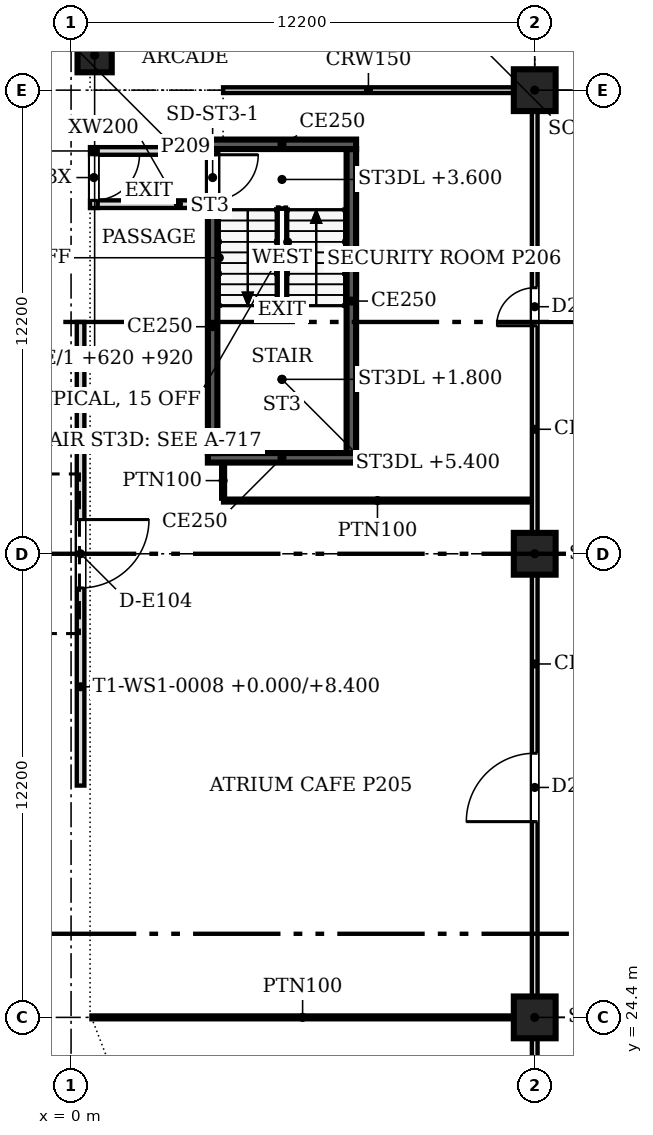
"""IFC4 building model, lengths in metres.
Left out: names, types, materials, properties, quantities, classifications, styles, units other than length and angle.
Written with IfcOpenShell. Run it as: python <this file> out.ifc"""

import sys

from ifc_helpers import new_model, si_unit, direction, frame, frame_2d, origin, origin_2d, place, context, subcontext, project, spatial, polyline, rectangle, outline, extrude, faceted_brep, source, transform, mapped, element, fill, save


model = new_model("IFC4")
c1 = context("Model", 3, precision=1e-05, world=origin(), true_north=direction((0.0, 1.0)))
c2 = subcontext(c1, "Body", "Model", "MODEL_VIEW")
j1 = project(units=[si_unit("LENGTHUNIT", "METRE"), si_unit("PLANEANGLEUNIT", "RADIAN")], contexts=[c1])
p1 = place(None, origin())
s1 = spatial("IfcSite", under=j1, at=p1, CompositionType="ELEMENT")
p2 = place(p1, origin())
s2 = spatial("IfcBuilding", under=s1, at=p2, CompositionType="ELEMENT")
p3 = place(p2, origin())
s3 = spatial("IfcBuildingStorey", under=s2, at=p3, CompositionType="ELEMENT", Elevation=0.0)
for number, where, z_axis, x_axis in (
    (1, (12.2, 24.4, 0.0), (0.0, 0.0, 1.0), (1.0, 0.0, 0.0)),
    (2, (12.2, 36.6, 0.0), (0.0, 0.0, 1.0), (1.0, 0.0, 0.0)),
    (3, (12.2, 48.8, 0.0), (0.0, 0.0, 1.0), (1.0, 0.0, 0.0)),
):
    element("IfcColumn", number, at=place(p3, frame(where, z_axis=z_axis, x_axis=x_axis)), inside=s3, PredefinedType="COLUMN", context=c2, shape_type="SweptSolid", body=[
        extrude(rectangle(XDim=1.1, YDim=1.1, at=origin_2d()), origin(), (0.0, 0.0, 1.0), 6.95),
    ])
p4 = place(p3, frame((0.62, 49.72, 0.0), z_axis=(0.0, 0.0, 1.0), x_axis=(1.0, 0.0, 0.0)))
e4 = element("IfcColumn", 4, at=p4, inside=s3, PredefinedType="COLUMN", context=c2, shape_type="SweptSolid", body=[
    extrude(rectangle(XDim=0.9, YDim=0.9, at=origin_2d()), origin(), (0.0, 0.0, 1.0), 6.95),
])
m1 = source(origin(), c2, "Body", "Brep", [
    faceted_brep([(0.0, -0.1, 0.0), (1.472, -0.1, 0.0), (1.472, -0.1, 6.383), (0.019, -0.1, 8.4), (0.0, -0.1, 8.373), (0.037, 0.1, 8.374), (1.472, 0.1, 6.383), (1.472, 0.1, 0.0), (0.037, 0.1, 0.0), (0.019, 0.0, 8.4)], [[[0, 1, 2, 3, 4]], [[5, 6, 7, 8]], [[8, 7, 1, 0]], [[7, 6, 2, 1]], [[6, 5, 9, 3, 2]], [[4, 3, 9]], [[8, 0, 4, 9, 5]]]),
])
p5 = place(p3, frame((0.25, 48.772, 0.0), z_axis=(0.0, 0.0, 1.0), x_axis=(0.0, -1.0, 0.0)))
e5 = element("IfcWall", 5, at=p5, inside=s3, PredefinedType="PARTITIONING", context=c2, shape_type="MappedRepresentation", body=[
    mapped(m1, transform((0.0, 0.0, 0.0), scale=1.0)),
])
m2 = source(origin(), c2, "Body", "SweptSolid", [
    extrude(outline(polyline([(0.219, 0.12), (1.352, 0.12), (1.352, 6.344), (0.219, 7.917), (0.219, 0.12)])), frame((0.0, 0.11, 0.0), z_axis=(0.0, -1.0, 0.0), x_axis=(1.0, 0.0, 0.0)), (0.0, 0.0, 1.0), 0.22),
])
p6 = place(p5, origin())
e6 = element("IfcOpeningElement", 6, at=p6, cuts=e5, PredefinedType="OPENING", context=c2, shape_type="MappedRepresentation", body=[
    mapped(m2, transform((0.0, 0.0, 0.0), scale=1.0)),
])
m3 = source(origin(), c2, "Body", "SweptSolid", [
    extrude(outline(polyline([(0.0, 0.0), (3.0, 0.0), (0.0, 4.163), (0.0, 0.0)])), frame((0.0, 0.1, 0.0), z_axis=(0.0, -1.0, 0.0), x_axis=(1.0, 0.0, 0.0)), (0.0, 0.0, 1.0), 0.2),
])
p7 = place(p3, frame((0.25, 45.7, 0.0), z_axis=(0.0, 0.0, 1.0), x_axis=(0.0, -1.0, 0.0)))
e7 = element("IfcWall", 7, at=p7, inside=s3, PredefinedType="PARTITIONING", context=c2, shape_type="MappedRepresentation", body=[
    mapped(m3, transform((0.0, 0.0, 0.0), scale=1.0)),
])
m4 = source(origin(), c2, "Body", "SweptSolid", [
    extrude(outline(polyline([(0.12, 0.12), (2.766, 0.12), (0.12, 3.791), (0.12, 0.12)])), frame((0.0, 0.11, 0.0), z_axis=(0.0, -1.0, 0.0), x_axis=(1.0, 0.0, 0.0)), (0.0, 0.0, 1.0), 0.22),
])
p8 = place(p7, origin())
e8 = element("IfcOpeningElement", 8, at=p8, cuts=e7, PredefinedType="OPENING", context=c2, shape_type="MappedRepresentation", body=[
    mapped(m4, transform((0.0, 0.0, 0.0), scale=1.0)),
])
m5 = source(origin(), c2, "Body", "SweptSolid", [
    extrude(outline(polyline([(1.6, 0.0), (1.6, 1.563), (0.0, 3.783), (0.0, 0.0), (1.6, 0.0)])), frame((0.0, 0.1, 0.0), z_axis=(0.0, -1.0, 0.0), x_axis=(1.0, 0.0, 0.0)), (0.0, 0.0, 1.0), 0.2),
])
p9 = place(p3, frame((0.25, 47.3, 2.6), z_axis=(0.0, 0.0, 1.0), x_axis=(0.0, -1.0, 0.0)))
e9 = element("IfcWall", 9, at=p9, inside=s3, PredefinedType="PARTITIONING", context=c2, shape_type="MappedRepresentation", body=[
    mapped(m5, transform((0.0, 0.0, 0.0), scale=1.0)),
])
m6 = source(origin(), c2, "Body", "SweptSolid", [
    extrude(outline(polyline([(1.48, 0.12), (1.48, 1.524), (0.12, 3.411), (0.12, 0.12), (1.48, 0.12)])), frame((0.0, 0.11, 0.0), z_axis=(0.0, -1.0, 0.0), x_axis=(1.0, 0.0, 0.0)), (0.0, 0.0, 1.0), 0.22),
])
p10 = place(p9, origin())
e10 = element("IfcOpeningElement", 10, at=p10, cuts=e9, PredefinedType="OPENING", context=c2, shape_type="MappedRepresentation", body=[
    mapped(m6, transform((0.0, 0.0, 0.0), scale=1.0)),
])
m7 = source(origin(), c2, "Body", "SweptSolid", [
    extrude(outline(polyline([(0.0, 0.0), (12.2, 0.0), (6.1, 8.4), (0.0, 0.0)])), frame((0.0, 0.1, 0.0), z_axis=(0.0, -1.0, 0.0), x_axis=(1.0, 0.0, 0.0)), (0.0, 0.0, 1.0), 0.2),
])
p11 = place(p3, frame((0.25, 42.7, 0.0), z_axis=(0.0, 0.0, 1.0), x_axis=(0.0, -1.0, 0.0)))
e11 = element("IfcWall", 11, at=p11, inside=s3, PredefinedType="PARTITIONING", context=c2, shape_type="MappedRepresentation", body=[
    mapped(m7, transform((0.0, 0.0, 0.0), scale=1.0)),
])
m8 = source(origin(), c2, "Body", "SweptSolid", [
    extrude(rectangle(XDim=1.8, YDim=3.0, at=frame_2d((0.9, 1.5))), frame((0.0, 0.11, 0.0), z_axis=(0.0, -1.0, 0.0), x_axis=(1.0, 0.0, 0.0)), (0.0, 0.0, 1.0), 0.22),
])
p12 = place(p11, frame((5.2, 0.0, 0.0)))
e12 = element("IfcOpeningElement", 12, at=p12, cuts=e11, PredefinedType="OPENING", context=c2, shape_type="MappedRepresentation", body=[
    mapped(m8, transform((0.0, 0.0, 0.0), scale=1.0)),
])
m9 = source(origin(), c2, "Body", "SweptSolid", [
    extrude(outline(polyline([(9.749, 3.12), (6.1, 8.145), (2.451, 3.12), (9.749, 3.12)])), frame((0.0, 0.11, 0.0), z_axis=(0.0, -1.0, 0.0), x_axis=(1.0, 0.0, 0.0)), (0.0, 0.0, 1.0), 0.22),
])
p13 = place(p11, origin())
e13 = element("IfcOpeningElement", 13, at=p13, cuts=e11, PredefinedType="OPENING", context=c2, shape_type="MappedRepresentation", body=[
    mapped(m9, transform((0.0, 0.0, 0.0), scale=1.0)),
])
m10 = source(origin(), c2, "Body", "SweptSolid", [
    extrude(outline(polyline([(0.294, 0.15), (5.08, 0.15), (5.08, 3.0), (2.364, 3.0), (0.294, 0.15)])), frame((0.0, 0.11, 0.0), z_axis=(0.0, -1.0, 0.0), x_axis=(1.0, 0.0, 0.0)), (0.0, 0.0, 1.0), 0.22),
])
p14 = place(p11, origin())
e14 = element("IfcOpeningElement", 14, at=p14, cuts=e11, PredefinedType="OPENING", context=c2, shape_type="MappedRepresentation", body=[
    mapped(m10, transform((0.0, 0.0, 0.0), scale=1.0)),
])
m11 = source(origin(), c2, "Body", "SweptSolid", [
    extrude(outline(polyline([(7.12, 0.15), (11.906, 0.15), (9.836, 3.0), (7.12, 3.0), (7.12, 0.15)])), frame((0.0, 0.11, 0.0), z_axis=(0.0, -1.0, 0.0), x_axis=(1.0, 0.0, 0.0)), (0.0, 0.0, 1.0), 0.22),
])
p15 = place(p11, origin())
e15 = element("IfcOpeningElement", 15, at=p15, cuts=e11, PredefinedType="OPENING", context=c2, shape_type="MappedRepresentation", body=[
    mapped(m11, transform((0.0, 0.0, 0.0), scale=1.0)),
])
m12 = source(origin(), c2, "Body", "Brep", [
    faceted_brep([(0.0, -0.1, 0.0), (6.072, -0.1, 0.0), (6.072, -0.1, 8.373), (6.053, -0.1, 8.4), (6.035, 0.1, 0.0), (0.0, 0.1, 0.0), (6.035, 0.1, 8.374), (6.053, 0.0, 8.4)], [[[0, 1, 2, 3]], [[4, 5, 6]], [[5, 4, 1, 0]], [[7, 3, 2]], [[6, 5, 0, 3, 7]], [[1, 4, 6, 7, 2]]]),
])
p16 = place(p3, frame((0.25, 30.5, 0.0), z_axis=(0.0, 0.0, 1.0), x_axis=(0.0, -1.0, 0.0)))
e16 = element("IfcWall", 16, at=p16, inside=s3, PredefinedType="PARTITIONING", context=c2, shape_type="MappedRepresentation", body=[
    mapped(m12, transform((0.0, 0.0, 0.0), scale=1.0)),
])
m13 = source(origin(), c2, "Body", "SweptSolid", [
    extrude(outline(polyline([(0.293, 0.15), (5.854, 0.15), (5.854, 7.866), (0.293, 0.15)])), frame((0.0, 0.11, 0.0), z_axis=(0.0, -1.0, 0.0), x_axis=(1.0, 0.0, 0.0)), (0.0, 0.0, 1.0), 0.22),
])
p17 = place(p16, origin())
e17 = element("IfcOpeningElement", 17, at=p17, cuts=e16, PredefinedType="OPENING", context=c2, shape_type="MappedRepresentation", body=[
    mapped(m13, transform((0.0, 0.0, 0.0), scale=1.0)),
])
m14 = source(origin(), c2, "Body", "Brep", [
    faceted_brep([(0.0, -0.25, 0.0), (6.1, -0.25, 8.4), (6.1, -0.25, 8.4), (5.482, -0.25, 8.4), (0.0, -0.25, 0.851), (0.0, 0.25, 0.851), (5.482, 0.25, 8.4), (6.1, 0.25, 8.4), (6.1, 0.25, 8.4), (0.0, 0.25, 0.0)], [[[0, 1, 2, 3, 4]], [[5, 6, 7, 8, 9]], [[9, 8, 1, 0]], [[7, 6, 3, 2]], [[6, 5, 4, 3]], [[5, 9, 0, 4]], [[1, 8, 7, 2]]]),
])
p18 = place(p3, frame((0.25, 42.7, 0.0), z_axis=(0.0, 0.0, 1.0), x_axis=(0.0, -1.0, 0.0)))
e18 = element("IfcWall", 18, at=p18, inside=s3, PredefinedType="SOLIDWALL", context=c2, shape_type="MappedRepresentation", body=[
    mapped(m14, transform((0.0, 0.0, 0.0), scale=1.0)),
])
m15 = source(origin(), c2, "Body", "Brep", [
    faceted_brep([(0.0, -0.25, 8.4), (6.053, -0.25, 0.0), (6.053, -0.25, 0.851), (0.613, -0.25, 8.4), (0.613, 0.25, 8.4), (6.053, 0.25, 0.851), (6.053, 0.25, 0.0), (0.047, 0.25, 8.335), (0.047, 0.25, 8.4), (0.0, 0.0, 8.4)], [[[0, 1, 2, 3]], [[4, 5, 6, 7, 8]], [[7, 6, 1, 0, 9]], [[5, 4, 3, 2]], [[4, 8, 9, 0, 3]], [[7, 9, 8]], [[1, 6, 5, 2]]]),
])
p19 = place(p3, frame((0.25, 48.753, 0.0), z_axis=(0.0, 0.0, 1.0), x_axis=(0.0, -1.0, 0.0)))
e19 = element("IfcWall", 19, at=p19, inside=s3, PredefinedType="SOLIDWALL", context=c2, shape_type="MappedRepresentation", body=[
    mapped(m15, transform((0.0, 0.0, 0.0), scale=1.0)),
])
m16 = source(origin(), c2, "Body", "Brep", [
    faceted_brep([(0.0, -0.25, 0.0), (6.053, -0.25, 8.4), (5.44, -0.25, 8.4), (0.0, -0.25, 0.851), (0.0, 0.25, 0.851), (5.44, 0.25, 8.4), (6.007, 0.25, 8.4), (6.007, 0.25, 8.335), (0.0, 0.25, 0.0), (6.053, 0.0, 8.4)], [[[0, 1, 2, 3]], [[4, 5, 6, 7, 8]], [[8, 7, 9, 1, 0]], [[6, 5, 2, 1, 9]], [[5, 4, 3, 2]], [[4, 8, 0, 3]], [[7, 6, 9]]]),
])
p20 = place(p3, frame((0.25, 30.5, 0.0), z_axis=(0.0, 0.0, 1.0), x_axis=(0.0, -1.0, 0.0)))
e20 = element("IfcWall", 20, at=p20, inside=s3, PredefinedType="SOLIDWALL", context=c2, shape_type="MappedRepresentation", body=[
    mapped(m16, transform((0.0, 0.0, 0.0), scale=1.0)),
])
m17 = source(origin(), c2, "Body", "SweptSolid", [
    extrude(outline(polyline([(0.0, 8.4), (6.1, 0.0), (6.1, 0.851), (0.618, 8.4), (0.0, 8.4)])), frame((0.0, 0.25, 0.0), z_axis=(0.0, -1.0, 0.0), x_axis=(1.0, 0.0, 0.0)), (0.0, 0.0, 1.0), 0.5),
])
p21 = place(p3, frame((0.25, 36.6, 0.0), z_axis=(0.0, 0.0, 1.0), x_axis=(0.0, -1.0, 0.0)))
e21 = element("IfcWall", 21, at=p21, inside=s3, PredefinedType="SOLIDWALL", context=c2, shape_type="MappedRepresentation", body=[
    mapped(m17, transform((0.0, 0.0, 0.0), scale=1.0)),
])
p22 = place(p2, frame((0.0, 0.0, 7.2)))
s4 = spatial("IfcBuildingStorey", under=s2, at=p22, CompositionType="ELEMENT", Elevation=7.2)
m18 = source(origin(), c2, "Body", "Brep", [
    faceted_brep([(0.0, -0.25, 0.0), (2.95, -0.25, 0.0), (2.95, -0.25, 16.122), (0.0, -0.25, 16.122), (0.053, 0.25, 16.122), (2.904, 0.25, 16.122), (2.904, 0.25, 0.0), (0.053, 0.25, 0.0), (2.95, 0.0, 0.0), (0.0, 0.0, 0.0), (2.95, 0.0, 16.122), (0.0, 0.0, 16.122)], [[[0, 1, 2, 3]], [[4, 5, 6, 7]], [[7, 6, 8, 1, 0, 9]], [[10, 2, 1, 8]], [[5, 4, 11, 3, 2, 10]], [[9, 0, 3, 11]], [[7, 9, 11, 4]], [[8, 6, 5, 10]]]),
])
p23 = place(p22, frame((1.312, 51.506, -7.2), z_axis=(0.0, 0.0, 1.0), x_axis=(-0.359921456299, -0.932982607178, 0.0)))
e22 = element("IfcWall", 22, at=p23, inside=s4, PredefinedType="SOLIDWALL", context=c2, shape_type="MappedRepresentation", body=[
    mapped(m18, transform((0.0, 0.0, 0.0), scale=1.0)),
])
m19 = source(origin(), c2, "Body", "Brep", [
    faceted_brep([(0.0, -0.25, 0.0), (2.95, -0.25, 0.0), (2.95, -0.25, 16.8), (0.0, -0.25, 16.8), (0.047, 0.25, 16.8), (2.898, 0.25, 16.8), (2.898, 0.25, 0.0), (0.047, 0.25, 0.0), (2.95, 0.0, 0.0), (0.0, 0.0, 0.0), (2.95, 0.0, 16.8), (0.0, 0.0, 16.8)], [[[0, 1, 2, 3]], [[4, 5, 6, 7]], [[7, 6, 8, 1, 0, 9]], [[10, 2, 1, 8]], [[5, 4, 11, 3, 2, 10]], [[9, 0, 3, 11]], [[7, 9, 11, 4]], [[8, 6, 5, 10]]]),
])
p24 = place(p22, frame((0.25, 24.447, -7.2), z_axis=(0.0, 0.0, 1.0), x_axis=(0.359877213415, -0.932999673775, 0.0)))
e23 = element("IfcWall", 23, at=p24, inside=s4, PredefinedType="SOLIDWALL", context=c2, shape_type="MappedRepresentation", body=[
    mapped(m19, transform((0.0, 0.0, 0.0), scale=1.0)),
])
p25 = place(p3, frame((7.5, 39.125, 0.0), z_axis=(0.0, 0.0, 1.0), x_axis=(-1.0, 0.0, 0.0)))
e24 = element("IfcWall", 24, at=p25, inside=s3, PredefinedType="SOLIDWALL", context=c2, shape_type="SweptSolid", body=[
    extrude(rectangle(XDim=3.9, YDim=0.25, at=frame_2d((1.95, 0.0))), origin(), (0.0, 0.0, 1.0), 7.2),
])
p26 = place(p3, frame((3.725, 39.25, 0.0), z_axis=(0.0, 0.0, 1.0), x_axis=(0.0, 1.0, 0.0)))
e25 = element("IfcWall", 25, at=p26, inside=s3, PredefinedType="SOLIDWALL", context=c2, shape_type="SweptSolid", body=[
    extrude(rectangle(XDim=8.0, YDim=0.25, at=frame_2d((4.0, 0.0))), origin(), (0.0, 0.0, 1.0), 7.2),
])
m20 = source(origin(), c2, "Body", "SweptSolid", [
    extrude(rectangle(XDim=1.2, YDim=2.1, at=frame_2d((0.6, 1.05))), frame((0.0, 0.135, 0.0), z_axis=(0.0, -1.0, 0.0), x_axis=(1.0, 0.0, 0.0)), (0.0, 0.0, 1.0), 0.27),
])
p27 = place(p26, frame((6.65, 0.0, 0.0)))
e26 = element("IfcOpeningElement", 26, at=p27, cuts=e25, PredefinedType="OPENING", context=c2, shape_type="MappedRepresentation", body=[
    mapped(m20, transform((0.0, 0.0, 0.0), scale=1.0)),
])
p28 = place(p3, frame((3.6, 47.375, 0.0), z_axis=(0.0, 0.0, 1.0), x_axis=(1.0, 0.0, 0.0)))
e27 = element("IfcWall", 27, at=p28, inside=s3, PredefinedType="SOLIDWALL", context=c2, shape_type="SweptSolid", body=[
    extrude(rectangle(XDim=3.9, YDim=0.25, at=frame_2d((1.95, 0.0))), origin(), (0.0, 0.0, 1.0), 7.2),
])
p29 = place(p3, frame((7.375, 47.25, 0.0), z_axis=(0.0, 0.0, 1.0), x_axis=(0.0, -1.0, 0.0)))
e28 = element("IfcWall", 28, at=p29, inside=s3, PredefinedType="SOLIDWALL", context=c2, shape_type="SweptSolid", body=[
    extrude(rectangle(XDim=8.0, YDim=0.25, at=frame_2d((4.0, 0.0))), origin(), (0.0, 0.0, 1.0), 7.2),
])
for number, where, z_axis, x_axis in (
    (29, (0.5, 45.8, 0.0), (0.0, 0.0, 1.0), (1.0, 0.0, 0.0)),
    (30, (0.5, 47.2, 0.0), (0.0, 0.0, 1.0), (1.0, 0.0, 0.0)),
):
    element("IfcWall", number, at=place(p3, frame(where, z_axis=z_axis, x_axis=x_axis)), inside=s3, PredefinedType="PARTITIONING", context=c2, shape_type="SweptSolid", body=[
        extrude(rectangle(XDim=3.1, YDim=0.2, at=frame_2d((1.55, 0.0))), origin(), (0.0, 0.0, 1.0), 6.115),
    ])
p30 = place(p3, frame((0.6, 45.7, 0.0), z_axis=(0.0, 0.0, 1.0), x_axis=(0.0, 1.0, 0.0)))
e31 = element("IfcWall", 31, at=p30, inside=s3, PredefinedType="PARTITIONING", context=c2, shape_type="SweptSolid", body=[
    extrude(rectangle(XDim=1.6, YDim=0.2, at=frame_2d((0.8, 0.0))), origin(), (0.0, 0.0, 1.0), 6.115),
])
m21 = source(origin(), c2, "Body", "SweptSolid", [
    extrude(rectangle(XDim=1.2, YDim=2.1, at=frame_2d((0.6, 1.05))), frame((0.0, 0.11, 0.0), z_axis=(0.0, -1.0, 0.0), x_axis=(1.0, 0.0, 0.0)), (0.0, 0.0, 1.0), 0.22),
])
p31 = place(p30, frame((0.2, 0.0, 0.0)))
e32 = element("IfcOpeningElement", 32, at=p31, cuts=e31, PredefinedType="OPENING", context=c2, shape_type="MappedRepresentation", body=[
    mapped(m21, transform((0.0, 0.0, 0.0), scale=1.0)),
])
p32 = place(p3, frame((12.2, 18.8, 0.0), z_axis=(0.0, 0.0, 1.0), x_axis=(0.0, 1.0, 0.0)))
e33 = element("IfcWall", 33, at=p32, inside=s3, PredefinedType="PARTITIONING", context=c2, shape_type="SweptSolid", body=[
    extrude(rectangle(XDim=5.049, YDim=0.15, at=frame_2d((2.524, 0.0))), origin(), (0.0, 0.0, 1.0), 6.115),
])
m22 = source(origin(), c2, "Body", "SweptSolid", [
    extrude(rectangle(XDim=1.0, YDim=2.1, at=frame_2d((0.5, 1.05))), frame((0.0, 0.085, 0.0), z_axis=(0.0, -1.0, 0.0), x_axis=(1.0, 0.0, 0.0)), (0.0, 0.0, 1.0), 0.17),
])
p33 = place(p32, frame((2.0, 0.0, 0.0)))
e34 = element("IfcOpeningElement", 34, at=p33, cuts=e33, PredefinedType="OPENING", context=c2, shape_type="MappedRepresentation", body=[
    mapped(m22, transform((0.0, 0.0, 0.0), scale=1.0)),
])
p34 = place(p3, frame((0.536, 24.4, 0.0), z_axis=(0.0, 0.0, 1.0), x_axis=(1.0, 0.0, 0.0)))
e35 = element("IfcWall", 35, at=p34, inside=s3, PredefinedType="PARTITIONING", context=c2, shape_type="SweptSolid", body=[
    extrude(rectangle(XDim=11.113, YDim=0.1, at=frame_2d((5.557, 0.0))), origin(), (0.0, 0.0, 1.0), 6.115),
])
p35 = place(p3, frame((12.2, 24.951, 0.0), z_axis=(0.0, 0.0, 1.0), x_axis=(0.0, 1.0, 0.0)))
e36 = element("IfcWall", 36, at=p35, inside=s3, PredefinedType="PARTITIONING", context=c2, shape_type="SweptSolid", body=[
    extrude(rectangle(XDim=11.098, YDim=0.15, at=frame_2d((5.549, 0.0))), origin(), (0.0, 0.0, 1.0), 6.115),
])
m23 = source(origin(), c2, "Body", "SweptSolid", [
    extrude(rectangle(XDim=1.8, YDim=2.1, at=frame_2d((0.9, 1.05))), frame((0.0, 0.085, 0.0), z_axis=(0.0, -1.0, 0.0), x_axis=(1.0, 0.0, 0.0)), (0.0, 0.0, 1.0), 0.17),
])
p36 = place(p35, frame((4.6, 0.0, 0.0)))
e37 = element("IfcOpeningElement", 37, at=p36, cuts=e36, PredefinedType="OPENING", context=c2, shape_type="MappedRepresentation", body=[
    mapped(m23, transform((0.0, 0.0, 0.0), scale=1.0)),
])
p37 = place(p3, frame((12.2, 37.151, 0.0), z_axis=(0.0, 0.0, 1.0), x_axis=(0.0, 1.0, 0.0)))
e38 = element("IfcWall", 38, at=p37, inside=s3, PredefinedType="PARTITIONING", context=c2, shape_type="SweptSolid", body=[
    extrude(rectangle(XDim=11.098, YDim=0.15, at=frame_2d((5.549, 0.0))), origin(), (0.0, 0.0, 1.0), 6.115),
])
p38 = place(p37, frame((5.45, 0.0, 0.0)))
e39 = element("IfcOpeningElement", 39, at=p38, cuts=e38, PredefinedType="OPENING", context=c2, shape_type="MappedRepresentation", body=[
    mapped(m22, transform((0.0, 0.0, 0.0), scale=1.0)),
])
p39 = place(p3, frame((4.0, 38.0, 0.0), z_axis=(0.0, 0.0, 1.0), x_axis=(1.0, 0.0, 0.0)))
e40 = element("IfcWall", 40, at=p39, inside=s3, PredefinedType="PARTITIONING", context=c2, shape_type="SweptSolid", body=[
    extrude(rectangle(XDim=8.124, YDim=0.1, at=frame_2d((4.062, 0.0))), origin(), (0.0, 0.0, 1.0), 6.115),
])
p40 = place(p3, frame((4.0, 38.051, 0.0), z_axis=(0.0, 0.0, 1.0), x_axis=(0.0, 1.0, 0.0)))
e41 = element("IfcWall", 41, at=p40, inside=s3, PredefinedType="PARTITIONING", context=c2, shape_type="SweptSolid", body=[
    extrude(rectangle(XDim=0.949, YDim=0.1, at=frame_2d((0.475, 0.0))), origin(), (0.0, 0.0, 1.0), 6.115),
])
p41 = place(p3, frame((4.0, 48.8, 0.0), z_axis=(0.0, 0.0, 1.0), x_axis=(1.0, 0.0, 0.0)))
e42 = element("IfcWall", 42, at=p41, inside=s3, PredefinedType="PARTITIONING", context=c2, shape_type="SweptSolid", body=[
    extrude(rectangle(XDim=7.649, YDim=0.15, at=frame_2d((3.824, 0.0))), origin(), (0.0, 0.0, 1.0), 6.115),
])
m24 = source(origin(), c2, "Body", "SweptSolid", [
    extrude(rectangle(XDim=1.8, YDim=3.0, at=frame_2d((0.9, 1.5))), frame((0.0, 0.025, 0.0), z_axis=(0.0, -1.0, 0.0), x_axis=(1.0, 0.0, 0.0)), (0.0, 0.0, 1.0), 0.05),
])
p42 = place(p12, origin())
e43 = element("IfcDoor", 43, at=p42, inside=s3, OperationType="DOUBLE_DOOR_SINGLE_SWING", PredefinedType="DOOR", context=c2, shape_type="MappedRepresentation", body=[
    mapped(m24, transform((0.0, 0.0, 0.0), scale=1.0)),
])
fill(e12, e43)
m25 = source(origin(), c2, "Body", "SweptSolid", [
    extrude(rectangle(XDim=1.2, YDim=2.1, at=frame_2d((0.6, 1.05))), frame((0.0, 0.025, 0.0), z_axis=(0.0, -1.0, 0.0), x_axis=(1.0, 0.0, 0.0)), (0.0, 0.0, 1.0), 0.05),
])
p43 = place(p27, origin())
e44 = element("IfcDoor", 44, at=p43, inside=s3, OperationType="SINGLE_SWING_RIGHT", PredefinedType="DOOR", context=c2, shape_type="MappedRepresentation", body=[
    mapped(m25, transform((0.0, 0.0, 0.0), scale=1.0)),
])
fill(e26, e44)
p44 = place(p31, origin())
e45 = element("IfcDoor", 45, at=p44, inside=s3, OperationType="SINGLE_SWING_RIGHT", PredefinedType="DOOR", context=c2, shape_type="MappedRepresentation", body=[
    mapped(m25, transform((0.0, 0.0, 0.0), scale=1.0)),
])
fill(e32, e45)
m26 = source(origin(), c2, "Body", "SweptSolid", [
    extrude(rectangle(XDim=1.0, YDim=2.1, at=frame_2d((0.5, 1.05))), frame((0.0, 0.025, 0.0), z_axis=(0.0, -1.0, 0.0), x_axis=(1.0, 0.0, 0.0)), (0.0, 0.0, 1.0), 0.05),
])
p45 = place(p38, origin())
e46 = element("IfcDoor", 46, at=p45, inside=s3, OperationType="SINGLE_SWING_LEFT", PredefinedType="DOOR", context=c2, shape_type="MappedRepresentation", body=[
    mapped(m26, transform((0.0, 0.0, 0.0), scale=1.0)),
])
fill(e39, e46)
m27 = source(origin(), c2, "Body", "SweptSolid", [
    extrude(rectangle(XDim=1.8, YDim=2.1, at=frame_2d((0.9, 1.05))), frame((0.0, 0.025, 0.0), z_axis=(0.0, -1.0, 0.0), x_axis=(1.0, 0.0, 0.0)), (0.0, 0.0, 1.0), 0.05),
])
p46 = place(p36, origin())
e47 = element("IfcDoor", 47, at=p46, inside=s3, OperationType="DOUBLE_DOOR_SINGLE_SWING", PredefinedType="DOOR", context=c2, shape_type="MappedRepresentation", body=[
    mapped(m27, transform((0.0, 0.0, 0.0), scale=1.0)),
])
fill(e37, e47)
save(model, sys.argv[1])
